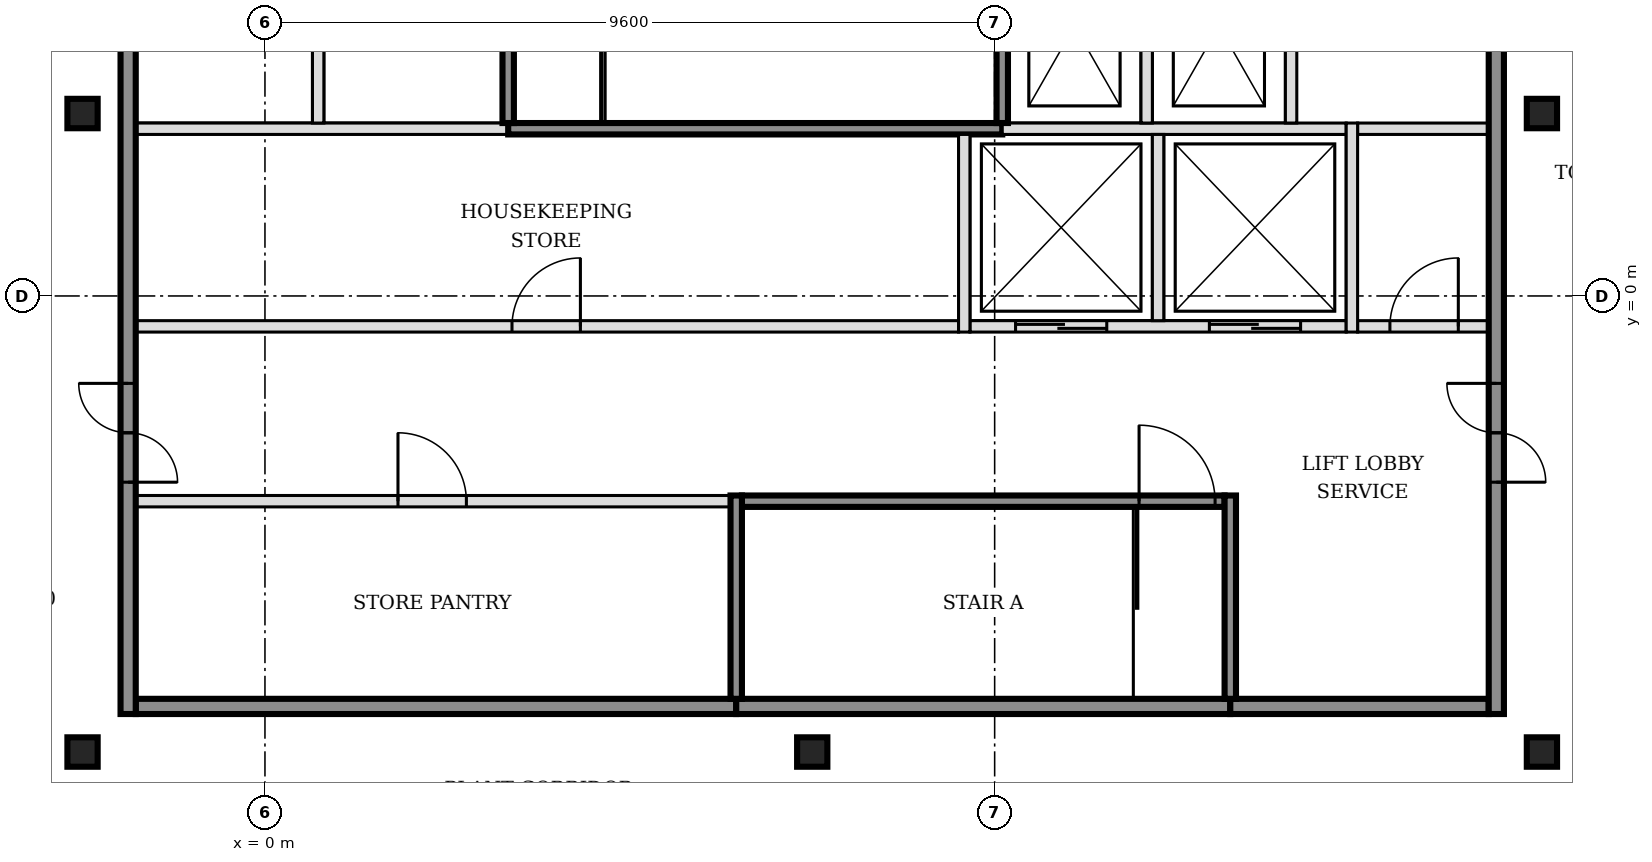
"""IFC4 building model, lengths in metres.
Left out: names, types, materials, properties, quantities, classifications, styles, units other than length and angle.
Written with IfcOpenShell. Run it as: python <this file> out.ifc"""

import sys

from ifc_helpers import new_model, si_unit, direction, frame, frame_2d, origin, origin_2d, place, context, subcontext, project, spatial, rectangle, hollow_rectangle, i_section, extrude, element, fill, save


model = new_model("IFC4")
c1 = context("Model", 3, precision=1e-05, world=origin(), true_north=direction((0.0, 1.0)))
c2 = subcontext(c1, "Body", "Model", "MODEL_VIEW")
j1 = project(units=[si_unit("LENGTHUNIT", "METRE"), si_unit("PLANEANGLEUNIT", "RADIAN")], contexts=[c1])
p1 = place(None, origin())
s1 = spatial("IfcSite", under=j1, at=p1, CompositionType="ELEMENT")
p2 = place(p1, origin())
s2 = spatial("IfcBuilding", under=s1, at=p2, CompositionType="ELEMENT")
p3 = place(p2, frame((0.0, 0.0, 295.8)))
s3 = spatial("IfcBuildingStorey", under=s2, at=p3, CompositionType="ELEMENT", Elevation=295.8)
p4 = place(p3, frame((7.2, -6.0, 5.7), z_axis=(0.0, 0.0, 1.0), x_axis=(1.0, 0.0, 0.0)))
e1 = element("IfcColumn", 1, at=p4, inside=s3, PredefinedType="COLUMN", context=c2, shape_type="SweptSolid", body=[
    extrude(hollow_rectangle(XDim=0.3, YDim=0.3, WallThickness=0.016, InnerFilletRadius=0.016, OuterFilletRadius=0.024, at=origin_2d()), origin(), (0.0, 0.0, 1.0), 6.632),
])
for number, where, z_axis, x_axis in (
    (2, (-2.4, -6.0, -0.2), (0.0, 0.0, 1.0), (1.0, 0.0, 0.0)),
    (3, (7.2, -6.0, -0.2), (0.0, 0.0, 1.0), (1.0, 0.0, 0.0)),
    (4, (16.8, -6.0, -0.2), (0.0, 0.0, 1.0), (1.0, 0.0, 0.0)),
    (5, (-2.4, 2.4, -0.2), (0.0, 0.0, 1.0), (1.0, 0.0, 0.0)),
    (6, (16.8, 2.4, -0.2), (0.0, 0.0, 1.0), (1.0, 0.0, 0.0)),
):
    element("IfcColumn", number, at=place(p3, frame(where, z_axis=z_axis, x_axis=x_axis)), inside=s3, PredefinedType="COLUMN", context=c2, shape_type="SweptSolid", body=[
        extrude(i_section(OverallWidth=0.398, OverallDepth=0.387, WebThickness=0.021, FlangeThickness=0.033, FilletRadius=0.015, at=origin_2d()), origin(), (0.0, 0.0, 1.0), 5.9),
    ])
p5 = place(p3, frame((-1.7, -5.4, 0.0), z_axis=(0.0, 0.0, 1.0), x_axis=(1.0, 0.0, 0.0)))
e7 = element("IfcWall", 7, at=p5, inside=s3, PredefinedType="SOLIDWALL", context=c2, shape_type="SweptSolid", body=[
    extrude(rectangle(XDim=7.9, YDim=0.2, at=frame_2d((3.95, 0.0))), origin(), (0.0, 0.0, 1.0), 5.7),
])
p6 = place(p3, frame((6.2, -5.4, 0.0), z_axis=(0.0, 0.0, 1.0), x_axis=(1.0, 0.0, 0.0)))
e8 = element("IfcWall", 8, at=p6, inside=s3, PredefinedType="SOLIDWALL", context=c2, shape_type="SweptSolid", body=[
    extrude(rectangle(XDim=6.5, YDim=0.2, at=frame_2d((3.25, 0.0))), origin(), (0.0, 0.0, 1.0), 5.7),
])
p7 = place(p3, frame((12.7, -5.4, 0.0), z_axis=(0.0, 0.0, 1.0), x_axis=(1.0, 0.0, 0.0)))
e9 = element("IfcWall", 9, at=p7, inside=s3, PredefinedType="SOLIDWALL", context=c2, shape_type="SweptSolid", body=[
    extrude(rectangle(XDim=3.4, YDim=0.2, at=frame_2d((1.7, 0.0))), origin(), (0.0, 0.0, 1.0), 5.7),
])
p8 = place(p3, frame((-1.7, -2.7, 0.0), z_axis=(0.0, 0.0, 1.0), x_axis=(1.0, 0.0, 0.0)))
e10 = element("IfcWall", 10, at=p8, inside=s3, PredefinedType="PARTITIONING", context=c2, shape_type="SweptSolid", body=[
    extrude(rectangle(XDim=7.825, YDim=0.15, at=frame_2d((3.913, 0.0))), origin(), (0.0, 0.0, 1.0), 5.7),
])
p9 = place(p8, frame((3.45, 0.0, 0.0)))
e11 = element("IfcOpeningElement", 11, at=p9, cuts=e10, PredefinedType="OPENING", context=c2, shape_type="SweptSolid", body=[
    extrude(rectangle(XDim=0.9, YDim=2.1, at=frame_2d((0.45, 1.05))), frame((0.0, 0.085, 0.0), z_axis=(0.0, -1.0, 0.0), x_axis=(1.0, 0.0, 0.0)), (0.0, 0.0, 1.0), 0.17),
])
p10 = place(p3, frame((6.275, -2.7, 0.0), z_axis=(0.0, 0.0, 1.0), x_axis=(1.0, 0.0, 0.0)))
e12 = element("IfcWall", 12, at=p10, inside=s3, PredefinedType="SOLIDWALL", context=c2, shape_type="SweptSolid", body=[
    extrude(rectangle(XDim=6.35, YDim=0.15, at=frame_2d((3.175, 0.0))), origin(), (0.0, 0.0, 1.0), 5.7),
])
p11 = place(p10, frame((5.225, 0.0, 0.0)))
e13 = element("IfcOpeningElement", 13, at=p11, cuts=e12, PredefinedType="OPENING", context=c2, shape_type="SweptSolid", body=[
    extrude(rectangle(XDim=1.0, YDim=2.1, at=frame_2d((0.5, 1.05))), frame((0.0, 0.085, 0.0), z_axis=(0.0, -1.0, 0.0), x_axis=(1.0, 0.0, 0.0)), (0.0, 0.0, 1.0), 0.17),
])
p12 = place(p3, frame((-1.7, -0.4, 0.0), z_axis=(0.0, 0.0, 1.0), x_axis=(1.0, 0.0, 0.0)))
e14 = element("IfcWall", 14, at=p12, inside=s3, PredefinedType="PARTITIONING", context=c2, shape_type="SweptSolid", body=[
    extrude(rectangle(XDim=10.825, YDim=0.15, at=frame_2d((5.413, 0.0))), origin(), (0.0, 0.0, 1.0), 5.7),
])
p13 = place(p12, frame((4.95, 0.0, 0.0)))
e15 = element("IfcOpeningElement", 15, at=p13, cuts=e14, PredefinedType="OPENING", context=c2, shape_type="SweptSolid", body=[
    extrude(rectangle(XDim=0.9, YDim=2.1, at=frame_2d((0.45, 1.05))), frame((0.0, 0.085, 0.0), z_axis=(0.0, -1.0, 0.0), x_axis=(1.0, 0.0, 0.0)), (0.0, 0.0, 1.0), 0.17),
])
p14 = place(p3, frame((9.275, -0.4, 0.0), z_axis=(0.0, 0.0, 1.0), x_axis=(1.0, 0.0, 0.0)))
e16 = element("IfcWall", 16, at=p14, inside=s3, PredefinedType="SOLIDWALL", context=c2, shape_type="SweptSolid", body=[
    extrude(rectangle(XDim=4.95, YDim=0.15, at=frame_2d((2.475, 0.0))), origin(), (0.0, 0.0, 1.0), 5.7),
])
p15 = place(p14, frame((0.6, 0.0, 0.0)))
e17 = element("IfcOpeningElement", 17, at=p15, cuts=e16, PredefinedType="OPENING", context=c2, shape_type="SweptSolid", body=[
    extrude(rectangle(XDim=1.2, YDim=2.1, at=frame_2d((0.6, 1.05))), frame((0.0, 0.085, 0.0), z_axis=(0.0, -1.0, 0.0), x_axis=(1.0, 0.0, 0.0)), (0.0, 0.0, 1.0), 0.17),
])
p16 = place(p14, frame((3.15, 0.0, 0.0)))
e18 = element("IfcOpeningElement", 18, at=p16, cuts=e16, PredefinedType="OPENING", context=c2, shape_type="SweptSolid", body=[
    extrude(rectangle(XDim=1.2, YDim=2.1, at=frame_2d((0.6, 1.05))), frame((0.0, 0.085, 0.0), z_axis=(0.0, -1.0, 0.0), x_axis=(1.0, 0.0, 0.0)), (0.0, 0.0, 1.0), 0.17),
])
p17 = place(p3, frame((14.375, -0.4, 0.0), z_axis=(0.0, 0.0, 1.0), x_axis=(1.0, 0.0, 0.0)))
e19 = element("IfcWall", 19, at=p17, inside=s3, PredefinedType="PARTITIONING", context=c2, shape_type="SweptSolid", body=[
    extrude(rectangle(XDim=1.725, YDim=0.15, at=frame_2d((0.863, 0.0))), origin(), (0.0, 0.0, 1.0), 5.7),
])
p18 = place(p17, frame((0.425, 0.0, 0.0)))
e20 = element("IfcOpeningElement", 20, at=p18, cuts=e19, PredefinedType="OPENING", context=c2, shape_type="SweptSolid", body=[
    extrude(rectangle(XDim=0.9, YDim=2.1, at=frame_2d((0.45, 1.05))), frame((0.0, 0.085, 0.0), z_axis=(0.0, -1.0, 0.0), x_axis=(1.0, 0.0, 0.0)), (0.0, 0.0, 1.0), 0.17),
])
p19 = place(p3, frame((-1.7, 2.2, 0.0), z_axis=(0.0, 0.0, 1.0), x_axis=(1.0, 0.0, 0.0)))
e21 = element("IfcWall", 21, at=p19, inside=s3, PredefinedType="SOLIDWALL", context=c2, shape_type="SweptSolid", body=[
    extrude(rectangle(XDim=4.9, YDim=0.15, at=frame_2d((2.45, 0.0))), origin(), (0.0, 0.0, 1.0), 5.7),
])
p20 = place(p3, frame((3.2, 2.2, 0.0), z_axis=(0.0, 0.0, 1.0), x_axis=(1.0, 0.0, 0.0)))
e22 = element("IfcWall", 22, at=p20, inside=s3, PredefinedType="SOLIDWALL", context=c2, shape_type="SweptSolid", body=[
    extrude(rectangle(XDim=6.5, YDim=0.15, at=frame_2d((3.25, 0.0))), origin(), (0.0, 0.0, 1.0), 5.7),
])
p21 = place(p3, frame((9.7, 2.2, 0.0), z_axis=(0.0, 0.0, 1.0), x_axis=(1.0, 0.0, 0.0)))
e23 = element("IfcWall", 23, at=p21, inside=s3, PredefinedType="SOLIDWALL", context=c2, shape_type="SweptSolid", body=[
    extrude(rectangle(XDim=4.525, YDim=0.15, at=frame_2d((2.263, 0.0))), origin(), (0.0, 0.0, 1.0), 5.7),
])
p22 = place(p3, frame((14.375, 2.2, 0.0), z_axis=(0.0, 0.0, 1.0), x_axis=(1.0, 0.0, 0.0)))
e24 = element("IfcWall", 24, at=p22, inside=s3, PredefinedType="PARTITIONING", context=c2, shape_type="SweptSolid", body=[
    extrude(rectangle(XDim=1.725, YDim=0.15, at=frame_2d((0.863, 0.0))), origin(), (0.0, 0.0, 1.0), 5.7),
])
p23 = place(p3, frame((-1.8, -5.5, 0.0), z_axis=(0.0, 0.0, 1.0), x_axis=(0.0, 1.0, 0.0)))
e25 = element("IfcWall", 25, at=p23, inside=s3, PredefinedType="SOLIDWALL", context=c2, shape_type="SweptSolid", body=[
    extrude(rectangle(XDim=15.8, YDim=0.2, at=frame_2d((7.9, 0.0))), origin(), (0.0, 0.0, 1.0), 5.7),
])
p24 = place(p23, frame((3.05, 0.0, 0.0)))
e26 = element("IfcOpeningElement", 26, at=p24, cuts=e25, PredefinedType="OPENING", context=c2, shape_type="SweptSolid", body=[
    extrude(rectangle(XDim=1.3, YDim=2.1, at=frame_2d((0.65, 1.05))), frame((0.0, 0.11, 0.0), z_axis=(0.0, -1.0, 0.0), x_axis=(1.0, 0.0, 0.0)), (0.0, 0.0, 1.0), 0.22),
])
p25 = place(p23, frame((11.45, 0.0, 0.0)))
e27 = element("IfcOpeningElement", 27, at=p25, cuts=e25, PredefinedType="OPENING", context=c2, shape_type="SweptSolid", body=[
    extrude(rectangle(XDim=1.3, YDim=2.1, at=frame_2d((0.65, 1.05))), frame((0.0, 0.11, 0.0), z_axis=(0.0, -1.0, 0.0), x_axis=(1.0, 0.0, 0.0)), (0.0, 0.0, 1.0), 0.22),
])
for number, where, z_axis, x_axis in (
    (28, (0.7, 2.275, 0.0), (0.0, 0.0, 1.0), (0.0, 1.0, 0.0)),
    (29, (3.2, 2.275, 0.0), (0.0, 0.0, 1.0), (0.0, 1.0, 0.0)),
):
    element("IfcWall", number, at=place(p3, frame(where, z_axis=z_axis, x_axis=x_axis)), inside=s3, PredefinedType="SOLIDWALL", context=c2, shape_type="SweptSolid", body=[
        extrude(rectangle(XDim=2.55, YDim=0.15, at=frame_2d((1.275, 0.0))), origin(), (0.0, 0.0, 1.0), 5.7),
    ])
p26 = place(p3, frame((6.2, -5.3, 0.0), z_axis=(0.0, 0.0, 1.0), x_axis=(0.0, 1.0, 0.0)))
e30 = element("IfcWall", 30, at=p26, inside=s3, PredefinedType="SOLIDWALL", context=c2, shape_type="SweptSolid", body=[
    extrude(rectangle(XDim=2.675, YDim=0.15, at=frame_2d((1.337, 0.0))), origin(), (0.0, 0.0, 1.0), 5.7),
])
p27 = place(p3, frame((9.2, -0.475, 0.0), z_axis=(0.0, 0.0, 1.0), x_axis=(0.0, 1.0, 0.0)))
e31 = element("IfcWall", 31, at=p27, inside=s3, PredefinedType="SOLIDWALL", context=c2, shape_type="SweptSolid", body=[
    extrude(rectangle(XDim=2.6, YDim=0.15, at=frame_2d((1.3, 0.0))), origin(), (0.0, 0.0, 1.0), 5.7),
])
for number, where, z_axis, x_axis in (
    (32, (9.7, 2.275, 0.0), (0.0, 0.0, 1.0), (0.0, 1.0, 0.0)),
    (33, (11.6, 2.275, 0.0), (0.0, 0.0, 1.0), (0.0, 1.0, 0.0)),
):
    element("IfcWall", number, at=place(p3, frame(where, z_axis=z_axis, x_axis=x_axis)), inside=s3, PredefinedType="SOLIDWALL", context=c2, shape_type="SweptSolid", body=[
        extrude(rectangle(XDim=2.55, YDim=0.15, at=frame_2d((1.275, 0.0))), origin(), (0.0, 0.0, 1.0), 5.7),
    ])
p28 = place(p3, frame((11.75, -0.325, 0.0), z_axis=(0.0, 0.0, 1.0), x_axis=(0.0, 1.0, 0.0)))
e34 = element("IfcWall", 34, at=p28, inside=s3, PredefinedType="SOLIDWALL", context=c2, shape_type="SweptSolid", body=[
    extrude(rectangle(XDim=2.45, YDim=0.15, at=frame_2d((1.225, 0.0))), origin(), (0.0, 0.0, 1.0), 5.7),
])
p29 = place(p3, frame((12.7, -5.3, 0.0), z_axis=(0.0, 0.0, 1.0), x_axis=(0.0, 1.0, 0.0)))
e35 = element("IfcWall", 35, at=p29, inside=s3, PredefinedType="SOLIDWALL", context=c2, shape_type="SweptSolid", body=[
    extrude(rectangle(XDim=2.675, YDim=0.15, at=frame_2d((1.337, 0.0))), origin(), (0.0, 0.0, 1.0), 5.7),
])
p30 = place(p3, frame((13.5, 2.275, 0.0), z_axis=(0.0, 0.0, 1.0), x_axis=(0.0, 1.0, 0.0)))
e36 = element("IfcWall", 36, at=p30, inside=s3, PredefinedType="SOLIDWALL", context=c2, shape_type="SweptSolid", body=[
    extrude(rectangle(XDim=2.55, YDim=0.15, at=frame_2d((1.275, 0.0))), origin(), (0.0, 0.0, 1.0), 5.7),
])
p31 = place(p3, frame((14.3, -0.475, 0.0), z_axis=(0.0, 0.0, 1.0), x_axis=(0.0, 1.0, 0.0)))
e37 = element("IfcWall", 37, at=p31, inside=s3, PredefinedType="SOLIDWALL", context=c2, shape_type="SweptSolid", body=[
    extrude(rectangle(XDim=2.75, YDim=0.15, at=frame_2d((1.375, 0.0))), origin(), (0.0, 0.0, 1.0), 5.7),
])
p32 = place(p3, frame((16.2, -5.5, 0.0), z_axis=(0.0, 0.0, 1.0), x_axis=(0.0, 1.0, 0.0)))
e38 = element("IfcWall", 38, at=p32, inside=s3, PredefinedType="SOLIDWALL", context=c2, shape_type="SweptSolid", body=[
    extrude(rectangle(XDim=15.8, YDim=0.2, at=frame_2d((7.9, 0.0))), origin(), (0.0, 0.0, 1.0), 5.7),
])
p33 = place(p32, frame((3.05, 0.0, 0.0)))
e39 = element("IfcOpeningElement", 39, at=p33, cuts=e38, PredefinedType="OPENING", context=c2, shape_type="SweptSolid", body=[
    extrude(rectangle(XDim=1.3, YDim=2.1, at=frame_2d((0.65, 1.05))), frame((0.0, 0.11, 0.0), z_axis=(0.0, -1.0, 0.0), x_axis=(1.0, 0.0, 0.0)), (0.0, 0.0, 1.0), 0.22),
])
p34 = place(p32, frame((11.45, 0.0, 0.0)))
e40 = element("IfcOpeningElement", 40, at=p34, cuts=e38, PredefinedType="OPENING", context=c2, shape_type="SweptSolid", body=[
    extrude(rectangle(XDim=1.3, YDim=2.1, at=frame_2d((0.65, 1.05))), frame((0.0, 0.11, 0.0), z_axis=(0.0, -1.0, 0.0), x_axis=(1.0, 0.0, 0.0)), (0.0, 0.0, 1.0), 0.22),
])
p35 = place(p15, origin())
e41 = element("IfcDoor", 41, at=p35, inside=s3, OperationType="DOUBLE_DOOR_SLIDING", PredefinedType="DOOR", context=c2, shape_type="SweptSolid", body=[
    extrude(rectangle(XDim=1.2, YDim=2.1, at=frame_2d((0.6, 1.05))), frame((0.0, 0.025, 0.0), z_axis=(0.0, -1.0, 0.0), x_axis=(1.0, 0.0, 0.0)), (0.0, 0.0, 1.0), 0.05),
])
fill(e17, e41)
p36 = place(p16, origin())
e42 = element("IfcDoor", 42, at=p36, inside=s3, OperationType="DOUBLE_DOOR_SLIDING", PredefinedType="DOOR", context=c2, shape_type="SweptSolid", body=[
    extrude(rectangle(XDim=1.2, YDim=2.1, at=frame_2d((0.6, 1.05))), frame((0.0, 0.025, 0.0), z_axis=(0.0, -1.0, 0.0), x_axis=(1.0, 0.0, 0.0)), (0.0, 0.0, 1.0), 0.05),
])
fill(e18, e42)
p37 = place(p11, origin())
e43 = element("IfcDoor", 43, at=p37, inside=s3, OperationType="SINGLE_SWING_LEFT", PredefinedType="DOOR", context=c2, shape_type="SweptSolid", body=[
    extrude(rectangle(XDim=1.0, YDim=2.1, at=frame_2d((0.5, 1.05))), frame((0.0, 0.025, 0.0), z_axis=(0.0, -1.0, 0.0), x_axis=(1.0, 0.0, 0.0)), (0.0, 0.0, 1.0), 0.05),
])
fill(e13, e43)
p38 = place(p24, origin())
e44 = element("IfcDoor", 44, at=p38, inside=s3, OperationType="DOUBLE_DOOR_SINGLE_SWING", PredefinedType="DOOR", context=c2, shape_type="SweptSolid", body=[
    extrude(rectangle(XDim=1.3, YDim=2.1, at=frame_2d((0.65, 1.05))), frame((0.0, 0.025, 0.0), z_axis=(0.0, -1.0, 0.0), x_axis=(1.0, 0.0, 0.0)), (0.0, 0.0, 1.0), 0.05),
])
fill(e26, e44)
p39 = place(p33, origin())
e45 = element("IfcDoor", 45, at=p39, inside=s3, OperationType="DOUBLE_DOOR_SINGLE_SWING", PredefinedType="DOOR", context=c2, shape_type="SweptSolid", body=[
    extrude(rectangle(XDim=1.3, YDim=2.1, at=frame_2d((0.65, 1.05))), frame((0.0, 0.025, 0.0), z_axis=(0.0, -1.0, 0.0), x_axis=(1.0, 0.0, 0.0)), (0.0, 0.0, 1.0), 0.05),
])
fill(e39, e45)
p40 = place(p18, origin())
e46 = element("IfcDoor", 46, at=p40, inside=s3, OperationType="SINGLE_SWING_RIGHT", PredefinedType="DOOR", context=c2, shape_type="SweptSolid", body=[
    extrude(rectangle(XDim=0.9, YDim=2.1, at=frame_2d((0.45, 1.05))), frame((0.0, 0.025, 0.0), z_axis=(0.0, -1.0, 0.0), x_axis=(1.0, 0.0, 0.0)), (0.0, 0.0, 1.0), 0.05),
])
fill(e20, e46)
p41 = place(p9, origin())
e47 = element("IfcDoor", 47, at=p41, inside=s3, OperationType="SINGLE_SWING_LEFT", PredefinedType="DOOR", context=c2, shape_type="SweptSolid", body=[
    extrude(rectangle(XDim=0.9, YDim=2.1, at=frame_2d((0.45, 1.05))), frame((0.0, 0.025, 0.0), z_axis=(0.0, -1.0, 0.0), x_axis=(1.0, 0.0, 0.0)), (0.0, 0.0, 1.0), 0.05),
])
fill(e11, e47)
p42 = place(p13, origin())
e48 = element("IfcDoor", 48, at=p42, inside=s3, OperationType="SINGLE_SWING_RIGHT", PredefinedType="DOOR", context=c2, shape_type="SweptSolid", body=[
    extrude(rectangle(XDim=0.9, YDim=2.1, at=frame_2d((0.45, 1.05))), frame((0.0, 0.025, 0.0), z_axis=(0.0, -1.0, 0.0), x_axis=(1.0, 0.0, 0.0)), (0.0, 0.0, 1.0), 0.05),
])
fill(e15, e48)
save(model, sys.argv[1])
